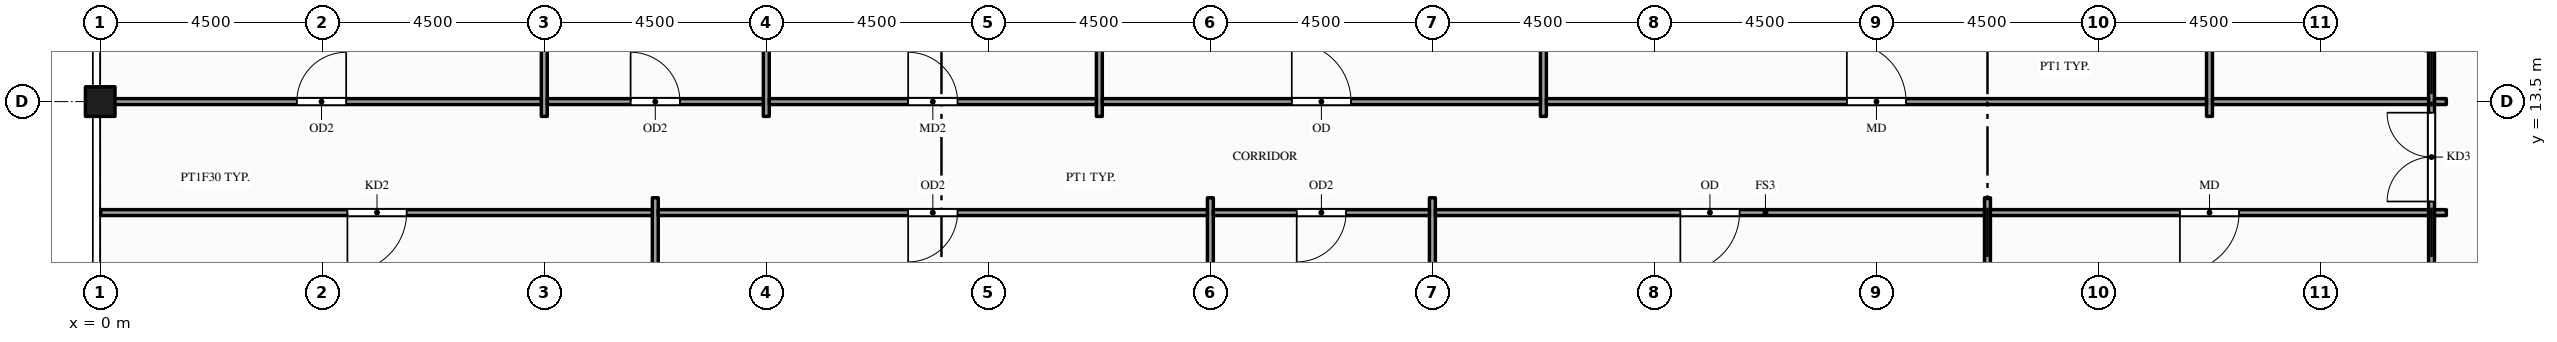
"""IFC4 building model, lengths in metres.
Left out: names, types, materials, properties, quantities, classifications, styles, units other than length and angle.
Written with IfcOpenShell. Run it as: python <this file> out.ifc"""

import sys

from ifc_helpers import new_model, si_unit, direction, frame, frame_2d, origin, origin_2d, place, context, subcontext, project, spatial, rectangle, hollow_rectangle, extrude, element, fill, save


model = new_model("IFC4")
c1 = context("Model", 3, precision=1e-05, world=origin(), true_north=direction((0.0, 1.0)))
c2 = subcontext(c1, "Body", "Model", "MODEL_VIEW")
j1 = project(units=[si_unit("LENGTHUNIT", "METRE"), si_unit("PLANEANGLEUNIT", "RADIAN")], contexts=[c1])
p1 = place(None, origin())
s1 = spatial("IfcSite", under=j1, at=p1, CompositionType="ELEMENT")
p2 = place(p1, origin())
s2 = spatial("IfcBuilding", under=s1, at=p2, CompositionType="ELEMENT")
p3 = place(p2, frame((0.0, 0.0, 318.5)))
s3 = spatial("IfcBuildingStorey", under=s2, at=p3, CompositionType="ELEMENT", Elevation=318.5)
p4 = place(p3, frame((0.0, 13.5, -0.15), z_axis=(0.0, 0.0, 1.0), x_axis=(1.0, 0.0, 0.0)))
e1 = element("IfcColumn", 1, at=p4, inside=s3, PredefinedType="COLUMN", context=c2, shape_type="SweptSolid", body=[
    extrude(hollow_rectangle(XDim=0.6, YDim=0.6, WallThickness=0.03, at=origin_2d()), origin(), (0.0, 0.0, 1.0), 4.5),
])
p5 = place(p3, frame((9.0, 13.2, 0.0), z_axis=(0.0, 0.0, 1.0), x_axis=(0.0, 1.0, 0.0)))
e2 = element("IfcWall", 2, at=p5, inside=s3, PredefinedType="PARTITIONING", context=c2, shape_type="SweptSolid", body=[
    extrude(rectangle(XDim=9.29, YDim=0.12, at=frame_2d((4.645, 0.0))), origin(), (0.0, 0.0, 1.0), 3.359),
])
p6 = place(p3, frame((11.25, 0.01, 0.0), z_axis=(0.0, 0.0, 1.0), x_axis=(0.0, 1.0, 0.0)))
e3 = element("IfcWall", 3, at=p6, inside=s3, PredefinedType="PARTITIONING", context=c2, shape_type="SweptSolid", body=[
    extrude(rectangle(XDim=11.54, YDim=0.12, at=frame_2d((5.77, 0.0))), origin(), (0.0, 0.0, 1.0), 3.359),
])
for number, where, z_axis, x_axis in (
    (4, (13.5, 13.2, 0.0), (0.0, 0.0, 1.0), (0.0, 1.0, 0.0)),
    (5, (20.25, 13.2, 0.0), (0.0, 0.0, 1.0), (0.0, 1.0, 0.0)),
):
    element("IfcWall", number, at=place(p3, frame(where, z_axis=z_axis, x_axis=x_axis)), inside=s3, PredefinedType="PARTITIONING", context=c2, shape_type="SweptSolid", body=[
        extrude(rectangle(XDim=9.29, YDim=0.12, at=frame_2d((4.645, 0.0))), origin(), (0.0, 0.0, 1.0), 3.359),
    ])
for number, where, z_axis, x_axis in (
    (6, (22.5, 0.01, 0.0), (0.0, 0.0, 1.0), (0.0, 1.0, 0.0)),
    (7, (27.0, 0.01, 0.0), (0.0, 0.0, 1.0), (0.0, 1.0, 0.0)),
):
    element("IfcWall", number, at=place(p3, frame(where, z_axis=z_axis, x_axis=x_axis)), inside=s3, PredefinedType="PARTITIONING", context=c2, shape_type="SweptSolid", body=[
        extrude(rectangle(XDim=11.54, YDim=0.12, at=frame_2d((5.77, 0.0))), origin(), (0.0, 0.0, 1.0), 3.359),
    ])
p7 = place(p3, frame((29.25, 13.2, 0.0), z_axis=(0.0, 0.0, 1.0), x_axis=(0.0, 1.0, 0.0)))
e8 = element("IfcWall", 8, at=p7, inside=s3, PredefinedType="PARTITIONING", context=c2, shape_type="SweptSolid", body=[
    extrude(rectangle(XDim=9.29, YDim=0.12, at=frame_2d((4.645, 0.0))), origin(), (0.0, 0.0, 1.0), 3.359),
])
p8 = place(p3, frame((38.25, 0.01, 0.0), z_axis=(0.0, 0.0, 1.0), x_axis=(0.0, 1.0, 0.0)))
e9 = element("IfcWall", 9, at=p8, inside=s3, PredefinedType="PARTITIONING", context=c2, shape_type="SweptSolid", body=[
    extrude(rectangle(XDim=11.54, YDim=0.12, at=frame_2d((5.77, 0.0))), origin(), (0.0, 0.0, 1.0), 3.359),
])
p9 = place(p3, frame((42.75, 13.2, 0.0), z_axis=(0.0, 0.0, 1.0), x_axis=(0.0, 1.0, 0.0)))
e10 = element("IfcWall", 10, at=p9, inside=s3, PredefinedType="PARTITIONING", context=c2, shape_type="SweptSolid", body=[
    extrude(rectangle(XDim=9.29, YDim=0.12, at=frame_2d((4.645, 0.0))), origin(), (0.0, 0.0, 1.0), 3.359),
])
p10 = place(p3, frame((47.25, 0.01, 0.0), z_axis=(0.0, 0.0, 1.0), x_axis=(0.0, 1.0, 0.0)))
e11 = element("IfcWall", 11, at=p10, inside=s3, PredefinedType="PARTITIONING", context=c2, shape_type="SweptSolid", body=[
    extrude(rectangle(XDim=22.48, YDim=0.12, at=frame_2d((11.24, 0.0))), origin(), (0.0, 0.0, 1.0), 3.359),
])
p11 = place(p10, frame((11.465, 0.0, 0.0)))
e12 = element("IfcOpeningElement", 12, at=p11, cuts=e11, PredefinedType="OPENING", context=c2, shape_type="SweptSolid", body=[
    extrude(rectangle(XDim=1.8, YDim=2.1, at=frame_2d((0.9, 1.05))), frame((0.0, 0.07, 0.0), z_axis=(0.0, -1.0, 0.0), x_axis=(1.0, 0.0, 0.0)), (0.0, 0.0, 1.0), 0.14),
])
p12 = place(p10, frame((14.49, 0.0, 0.0)))
e13 = element("IfcOpeningElement", 13, at=p12, cuts=e11, PredefinedType="OPENING", context=c2, shape_type="SweptSolid", body=[
    extrude(rectangle(XDim=0.9, YDim=2.1, at=frame_2d((0.45, 1.05))), frame((0.0, 0.07, 0.0), z_axis=(0.0, -1.0, 0.0), x_axis=(1.0, 0.0, 0.0)), (0.0, 0.0, 1.0), 0.14),
])
p13 = place(p10, frame((17.54, 0.0, 0.0)))
e14 = element("IfcOpeningElement", 14, at=p13, cuts=e11, PredefinedType="OPENING", context=c2, shape_type="SweptSolid", body=[
    extrude(rectangle(XDim=0.9, YDim=2.1, at=frame_2d((0.45, 1.05))), frame((0.0, 0.07, 0.0), z_axis=(0.0, -1.0, 0.0), x_axis=(1.0, 0.0, 0.0)), (0.0, 0.0, 1.0), 0.14),
])
p14 = place(p10, frame((20.49, 0.0, 0.0)))
e15 = element("IfcOpeningElement", 15, at=p14, cuts=e11, PredefinedType="OPENING", context=c2, shape_type="SweptSolid", body=[
    extrude(rectangle(XDim=1.0, YDim=2.1, at=frame_2d((0.5, 1.05))), frame((0.0, 0.07, 0.0), z_axis=(0.0, -1.0, 0.0), x_axis=(1.0, 0.0, 0.0)), (0.0, 0.0, 1.0), 0.14),
])
p15 = place(p3, frame((0.01, 11.25, 0.0), z_axis=(0.0, 0.0, 1.0), x_axis=(1.0, 0.0, 0.0)))
e16 = element("IfcWall", 16, at=p15, inside=s3, PredefinedType="PARTITIONING", context=c2, shape_type="SweptSolid", body=[
    extrude(rectangle(XDim=11.18, YDim=0.12, at=frame_2d((5.59, 0.0))), origin(), (0.0, 0.0, 1.0), 3.359),
])
p16 = place(p15, frame((5.0, 0.0, 0.0)))
e17 = element("IfcOpeningElement", 17, at=p16, cuts=e16, PredefinedType="OPENING", context=c2, shape_type="SweptSolid", body=[
    extrude(rectangle(XDim=1.2, YDim=2.1, at=frame_2d((0.6, 1.05))), frame((0.0, 0.07, 0.0), z_axis=(0.0, -1.0, 0.0), x_axis=(1.0, 0.0, 0.0)), (0.0, 0.0, 1.0), 0.14),
])
p17 = place(p3, frame((11.31, 11.25, 0.0), z_axis=(0.0, 0.0, 1.0), x_axis=(1.0, 0.0, 0.0)))
e18 = element("IfcWall", 18, at=p17, inside=s3, PredefinedType="PARTITIONING", context=c2, shape_type="SweptSolid", body=[
    extrude(rectangle(XDim=11.13, YDim=0.12, at=frame_2d((5.565, 0.0))), origin(), (0.0, 0.0, 1.0), 3.359),
])
p18 = place(p17, frame((5.065, 0.0, 0.0)))
e19 = element("IfcOpeningElement", 19, at=p18, cuts=e18, PredefinedType="OPENING", context=c2, shape_type="SweptSolid", body=[
    extrude(rectangle(XDim=1.0, YDim=2.1, at=frame_2d((0.5, 1.05))), frame((0.0, 0.07, 0.0), z_axis=(0.0, -1.0, 0.0), x_axis=(1.0, 0.0, 0.0)), (0.0, 0.0, 1.0), 0.14),
])
p19 = place(p3, frame((22.56, 11.25, 0.0), z_axis=(0.0, 0.0, 1.0), x_axis=(1.0, 0.0, 0.0)))
e20 = element("IfcWall", 20, at=p19, inside=s3, PredefinedType="PARTITIONING", context=c2, shape_type="SweptSolid", body=[
    extrude(rectangle(XDim=4.38, YDim=0.12, at=frame_2d((2.19, 0.0))), origin(), (0.0, 0.0, 1.0), 3.359),
])
p20 = place(p19, frame((1.69, 0.0, 0.0)))
e21 = element("IfcOpeningElement", 21, at=p20, cuts=e20, PredefinedType="OPENING", context=c2, shape_type="SweptSolid", body=[
    extrude(rectangle(XDim=1.0, YDim=2.1, at=frame_2d((0.5, 1.05))), frame((0.0, 0.07, 0.0), z_axis=(0.0, -1.0, 0.0), x_axis=(1.0, 0.0, 0.0)), (0.0, 0.0, 1.0), 0.14),
])
p21 = place(p3, frame((27.06, 11.25, 0.0), z_axis=(0.0, 0.0, 1.0), x_axis=(1.0, 0.0, 0.0)))
e22 = element("IfcWall", 22, at=p21, inside=s3, PredefinedType="PARTITIONING", context=c2, shape_type="SweptSolid", body=[
    extrude(rectangle(XDim=11.13, YDim=0.12, at=frame_2d((5.565, 0.0))), origin(), (0.0, 0.0, 1.0), 3.359),
])
p22 = place(p21, frame((4.965, 0.0, 0.0)))
e23 = element("IfcOpeningElement", 23, at=p22, cuts=e22, PredefinedType="OPENING", context=c2, shape_type="SweptSolid", body=[
    extrude(rectangle(XDim=1.2, YDim=2.1, at=frame_2d((0.6, 1.05))), frame((0.0, 0.07, 0.0), z_axis=(0.0, -1.0, 0.0), x_axis=(1.0, 0.0, 0.0)), (0.0, 0.0, 1.0), 0.14),
])
p23 = place(p3, frame((38.31, 11.25, 0.0), z_axis=(0.0, 0.0, 1.0), x_axis=(1.0, 0.0, 0.0)))
e24 = element("IfcWall", 24, at=p23, inside=s3, PredefinedType="PARTITIONING", context=c2, shape_type="SweptSolid", body=[
    extrude(rectangle(XDim=8.88, YDim=0.12, at=frame_2d((4.44, 0.0))), origin(), (0.0, 0.0, 1.0), 3.359),
])
p24 = place(p23, frame((3.84, 0.0, 0.0)))
e25 = element("IfcOpeningElement", 25, at=p24, cuts=e24, PredefinedType="OPENING", context=c2, shape_type="SweptSolid", body=[
    extrude(rectangle(XDim=1.2, YDim=2.1, at=frame_2d((0.6, 1.05))), frame((0.0, 0.07, 0.0), z_axis=(0.0, -1.0, 0.0), x_axis=(1.0, 0.0, 0.0)), (0.0, 0.0, 1.0), 0.14),
])
p25 = place(p3, frame((47.31, 11.25, 0.0), z_axis=(0.0, 0.0, 1.0), x_axis=(1.0, 0.0, 0.0)))
e26 = element("IfcWall", 26, at=p25, inside=s3, PredefinedType="PARTITIONING", context=c2, shape_type="SweptSolid", body=[
    extrude(rectangle(XDim=0.24, YDim=0.12, at=frame_2d((0.12, 0.0))), origin(), (0.0, 0.0, 1.0), 3.359),
])
p26 = place(p3, frame((0.01, 13.5, 0.0), z_axis=(0.0, 0.0, 1.0), x_axis=(1.0, 0.0, 0.0)))
e27 = element("IfcWall", 27, at=p26, inside=s3, PredefinedType="PARTITIONING", context=c2, shape_type="SweptSolid", body=[
    extrude(rectangle(XDim=8.93, YDim=0.12, at=frame_2d((4.465, 0.0))), origin(), (0.0, 0.0, 1.0), 3.359),
])
p27 = place(p26, frame((3.975, 0.0, 0.0)))
e28 = element("IfcOpeningElement", 28, at=p27, cuts=e27, PredefinedType="OPENING", context=c2, shape_type="SweptSolid", body=[
    extrude(rectangle(XDim=1.0, YDim=2.1, at=frame_2d((0.5, 1.05))), frame((0.0, 0.07, 0.0), z_axis=(0.0, -1.0, 0.0), x_axis=(1.0, 0.0, 0.0)), (0.0, 0.0, 1.0), 0.14),
])
p28 = place(p3, frame((9.06, 13.5, 0.0), z_axis=(0.0, 0.0, 1.0), x_axis=(1.0, 0.0, 0.0)))
e29 = element("IfcWall", 29, at=p28, inside=s3, PredefinedType="PARTITIONING", context=c2, shape_type="SweptSolid", body=[
    extrude(rectangle(XDim=4.38, YDim=0.12, at=frame_2d((2.19, 0.0))), origin(), (0.0, 0.0, 1.0), 3.359),
])
p29 = place(p28, frame((1.69, 0.0, 0.0)))
e30 = element("IfcOpeningElement", 30, at=p29, cuts=e29, PredefinedType="OPENING", context=c2, shape_type="SweptSolid", body=[
    extrude(rectangle(XDim=1.0, YDim=2.1, at=frame_2d((0.5, 1.05))), frame((0.0, 0.07, 0.0), z_axis=(0.0, -1.0, 0.0), x_axis=(1.0, 0.0, 0.0)), (0.0, 0.0, 1.0), 0.14),
])
p30 = place(p3, frame((13.56, 13.5, 0.0), z_axis=(0.0, 0.0, 1.0), x_axis=(1.0, 0.0, 0.0)))
e31 = element("IfcWall", 31, at=p30, inside=s3, PredefinedType="PARTITIONING", context=c2, shape_type="SweptSolid", body=[
    extrude(rectangle(XDim=6.63, YDim=0.12, at=frame_2d((3.315, 0.0))), origin(), (0.0, 0.0, 1.0), 3.359),
])
p31 = place(p30, frame((2.815, 0.0, 0.0)))
e32 = element("IfcOpeningElement", 32, at=p31, cuts=e31, PredefinedType="OPENING", context=c2, shape_type="SweptSolid", body=[
    extrude(rectangle(XDim=1.0, YDim=2.1, at=frame_2d((0.5, 1.05))), frame((0.0, 0.07, 0.0), z_axis=(0.0, -1.0, 0.0), x_axis=(1.0, 0.0, 0.0)), (0.0, 0.0, 1.0), 0.14),
])
p32 = place(p3, frame((20.31, 13.5, 0.0), z_axis=(0.0, 0.0, 1.0), x_axis=(1.0, 0.0, 0.0)))
e33 = element("IfcWall", 33, at=p32, inside=s3, PredefinedType="PARTITIONING", context=c2, shape_type="SweptSolid", body=[
    extrude(rectangle(XDim=8.88, YDim=0.12, at=frame_2d((4.44, 0.0))), origin(), (0.0, 0.0, 1.0), 3.359),
])
p33 = place(p32, frame((3.84, 0.0, 0.0)))
e34 = element("IfcOpeningElement", 34, at=p33, cuts=e33, PredefinedType="OPENING", context=c2, shape_type="SweptSolid", body=[
    extrude(rectangle(XDim=1.2, YDim=2.1, at=frame_2d((0.6, 1.05))), frame((0.0, 0.07, 0.0), z_axis=(0.0, -1.0, 0.0), x_axis=(1.0, 0.0, 0.0)), (0.0, 0.0, 1.0), 0.14),
])
p34 = place(p3, frame((29.31, 13.5, 0.0), z_axis=(0.0, 0.0, 1.0), x_axis=(1.0, 0.0, 0.0)))
e35 = element("IfcWall", 35, at=p34, inside=s3, PredefinedType="PARTITIONING", context=c2, shape_type="SweptSolid", body=[
    extrude(rectangle(XDim=13.38, YDim=0.12, at=frame_2d((6.69, 0.0))), origin(), (0.0, 0.0, 1.0), 3.359),
])
p35 = place(p34, frame((6.09, 0.0, 0.0)))
e36 = element("IfcOpeningElement", 36, at=p35, cuts=e35, PredefinedType="OPENING", context=c2, shape_type="SweptSolid", body=[
    extrude(rectangle(XDim=1.2, YDim=2.1, at=frame_2d((0.6, 1.05))), frame((0.0, 0.07, 0.0), z_axis=(0.0, -1.0, 0.0), x_axis=(1.0, 0.0, 0.0)), (0.0, 0.0, 1.0), 0.14),
])
p36 = place(p3, frame((42.81, 13.5, 0.0), z_axis=(0.0, 0.0, 1.0), x_axis=(1.0, 0.0, 0.0)))
e37 = element("IfcWall", 37, at=p36, inside=s3, PredefinedType="PARTITIONING", context=c2, shape_type="SweptSolid", body=[
    extrude(rectangle(XDim=4.38, YDim=0.12, at=frame_2d((2.19, 0.0))), origin(), (0.0, 0.0, 1.0), 3.359),
])
p37 = place(p3, frame((47.31, 13.5, 0.0), z_axis=(0.0, 0.0, 1.0), x_axis=(1.0, 0.0, 0.0)))
e38 = element("IfcWall", 38, at=p37, inside=s3, PredefinedType="PARTITIONING", context=c2, shape_type="SweptSolid", body=[
    extrude(rectangle(XDim=0.24, YDim=0.12, at=frame_2d((0.12, 0.0))), origin(), (0.0, 0.0, 1.0), 3.359),
])
p38 = place(p11, origin())
e39 = element("IfcDoor", 39, at=p38, inside=s3, OperationType="DOUBLE_DOOR_SINGLE_SWING", PredefinedType="DOOR", context=c2, shape_type="SweptSolid", body=[
    extrude(rectangle(XDim=1.8, YDim=2.1, at=frame_2d((0.9, 1.05))), frame((0.0, 0.025, 0.0), z_axis=(0.0, -1.0, 0.0), x_axis=(1.0, 0.0, 0.0)), (0.0, 0.0, 1.0), 0.05),
])
fill(e12, e39)
p39 = place(p16, origin())
e40 = element("IfcDoor", 40, at=p39, inside=s3, OperationType="SINGLE_SWING_LEFT", PredefinedType="DOOR", context=c2, shape_type="SweptSolid", body=[
    extrude(rectangle(XDim=1.2, YDim=2.1, at=frame_2d((0.6, 1.05))), frame((0.0, 0.025, 0.0), z_axis=(0.0, -1.0, 0.0), x_axis=(1.0, 0.0, 0.0)), (0.0, 0.0, 1.0), 0.05),
])
fill(e17, e40)
p40 = place(p18, origin())
e41 = element("IfcDoor", 41, at=p40, inside=s3, OperationType="SINGLE_SWING_LEFT", PredefinedType="DOOR", context=c2, shape_type="SweptSolid", body=[
    extrude(rectangle(XDim=1.0, YDim=2.1, at=frame_2d((0.5, 1.05))), frame((0.0, 0.025, 0.0), z_axis=(0.0, -1.0, 0.0), x_axis=(1.0, 0.0, 0.0)), (0.0, 0.0, 1.0), 0.05),
])
fill(e19, e41)
p41 = place(p20, origin())
e42 = element("IfcDoor", 42, at=p41, inside=s3, OperationType="SINGLE_SWING_LEFT", PredefinedType="DOOR", context=c2, shape_type="SweptSolid", body=[
    extrude(rectangle(XDim=1.0, YDim=2.1, at=frame_2d((0.5, 1.05))), frame((0.0, 0.025, 0.0), z_axis=(0.0, -1.0, 0.0), x_axis=(1.0, 0.0, 0.0)), (0.0, 0.0, 1.0), 0.05),
])
fill(e21, e42)
p42 = place(p22, origin())
e43 = element("IfcDoor", 43, at=p42, inside=s3, OperationType="SINGLE_SWING_LEFT", PredefinedType="DOOR", context=c2, shape_type="SweptSolid", body=[
    extrude(rectangle(XDim=1.2, YDim=2.1, at=frame_2d((0.6, 1.05))), frame((0.0, 0.025, 0.0), z_axis=(0.0, -1.0, 0.0), x_axis=(1.0, 0.0, 0.0)), (0.0, 0.0, 1.0), 0.05),
])
fill(e23, e43)
p43 = place(p24, origin())
e44 = element("IfcDoor", 44, at=p43, inside=s3, OperationType="SINGLE_SWING_LEFT", PredefinedType="DOOR", context=c2, shape_type="SweptSolid", body=[
    extrude(rectangle(XDim=1.2, YDim=2.1, at=frame_2d((0.6, 1.05))), frame((0.0, 0.025, 0.0), z_axis=(0.0, -1.0, 0.0), x_axis=(1.0, 0.0, 0.0)), (0.0, 0.0, 1.0), 0.05),
])
fill(e25, e44)
p44 = place(p27, origin())
e45 = element("IfcDoor", 45, at=p44, inside=s3, OperationType="SINGLE_SWING_RIGHT", PredefinedType="DOOR", context=c2, shape_type="SweptSolid", body=[
    extrude(rectangle(XDim=1.0, YDim=2.1, at=frame_2d((0.5, 1.05))), frame((0.0, 0.025, 0.0), z_axis=(0.0, -1.0, 0.0), x_axis=(1.0, 0.0, 0.0)), (0.0, 0.0, 1.0), 0.05),
])
fill(e28, e45)
p45 = place(p29, origin())
e46 = element("IfcDoor", 46, at=p45, inside=s3, OperationType="SINGLE_SWING_LEFT", PredefinedType="DOOR", context=c2, shape_type="SweptSolid", body=[
    extrude(rectangle(XDim=1.0, YDim=2.1, at=frame_2d((0.5, 1.05))), frame((0.0, 0.025, 0.0), z_axis=(0.0, -1.0, 0.0), x_axis=(1.0, 0.0, 0.0)), (0.0, 0.0, 1.0), 0.05),
])
fill(e30, e46)
p46 = place(p31, origin())
e47 = element("IfcDoor", 47, at=p46, inside=s3, OperationType="SINGLE_SWING_LEFT", PredefinedType="DOOR", context=c2, shape_type="SweptSolid", body=[
    extrude(rectangle(XDim=1.0, YDim=2.1, at=frame_2d((0.5, 1.05))), frame((0.0, 0.025, 0.0), z_axis=(0.0, -1.0, 0.0), x_axis=(1.0, 0.0, 0.0)), (0.0, 0.0, 1.0), 0.05),
])
fill(e32, e47)
p47 = place(p33, origin())
e48 = element("IfcDoor", 48, at=p47, inside=s3, OperationType="SINGLE_SWING_LEFT", PredefinedType="DOOR", context=c2, shape_type="SweptSolid", body=[
    extrude(rectangle(XDim=1.2, YDim=2.1, at=frame_2d((0.6, 1.05))), frame((0.0, 0.025, 0.0), z_axis=(0.0, -1.0, 0.0), x_axis=(1.0, 0.0, 0.0)), (0.0, 0.0, 1.0), 0.05),
])
fill(e34, e48)
p48 = place(p35, origin())
e49 = element("IfcDoor", 49, at=p48, inside=s3, OperationType="SINGLE_SWING_LEFT", PredefinedType="DOOR", context=c2, shape_type="SweptSolid", body=[
    extrude(rectangle(XDim=1.2, YDim=2.1, at=frame_2d((0.6, 1.05))), frame((0.0, 0.025, 0.0), z_axis=(0.0, -1.0, 0.0), x_axis=(1.0, 0.0, 0.0)), (0.0, 0.0, 1.0), 0.05),
])
fill(e36, e49)
save(model, sys.argv[1])
